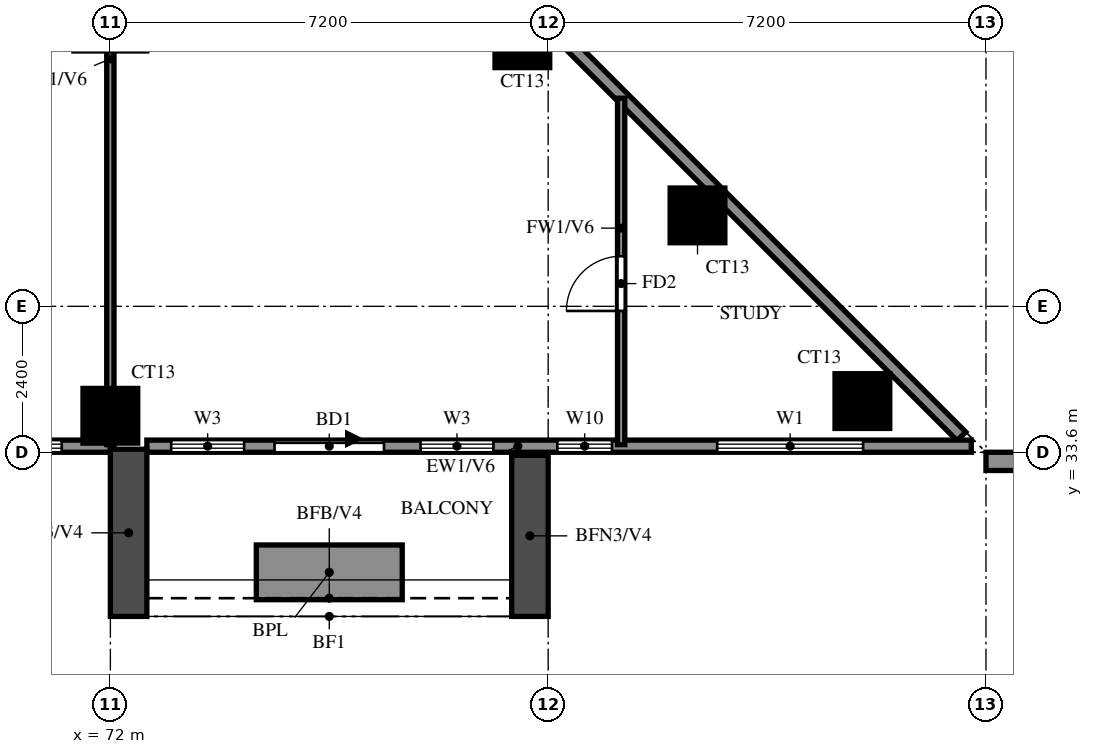
"""IFC4 building model, lengths in metres.
Left out: names, types, materials, properties, quantities, classifications, styles, units other than length and angle.
Written with IfcOpenShell. Run it as: python <this file> out.ifc"""

import sys

from ifc_helpers import new_model, si_unit, direction, frame, frame_2d, origin, origin_2d, place, context, subcontext, project, spatial, rectangle, extrude, source, transform, mapped, element, fill, save


model = new_model("IFC4")
c1 = context("Model", 3, precision=1e-05, world=origin(), true_north=direction((0.0, 1.0)))
c2 = subcontext(c1, "Body", "Model", "MODEL_VIEW")
j1 = project(units=[si_unit("LENGTHUNIT", "METRE"), si_unit("PLANEANGLEUNIT", "RADIAN")], contexts=[c1])
p1 = place(None, origin())
s1 = spatial("IfcSite", under=j1, at=p1, CompositionType="ELEMENT")
p2 = place(p1, origin())
s2 = spatial("IfcBuilding", under=s1, at=p2, CompositionType="ELEMENT")
p3 = place(p2, frame((0.0, 0.0, 104.0)))
s3 = spatial("IfcBuildingStorey", under=s2, at=p3, CompositionType="ELEMENT", Elevation=104.0)
m1 = source(origin(), c2, "Body", "SweptSolid", [
    extrude(rectangle(XDim=0.9, YDim=0.9, at=origin_2d()), origin(), (0.0, 0.0, 1.0), 3.1),
])
for number, where, z_axis, x_axis in (
    (1, (72.0, 34.2, 0.0), (0.0, 0.0, 1.0), (1.0, 0.0, 0.0)),
    (2, (84.367, 34.442, 0.0), (0.0, 0.0, 1.0), (1.0, 0.0, 0.0)),
    (3, (81.656, 37.496, 0.0), (0.0, 0.0, 1.0), (1.0, 0.0, 0.0)),
    (4, (78.776, 40.376, 0.0), (0.0, 0.0, 1.0), (1.0, 0.0, 0.0)),
):
    element("IfcColumn", number, at=place(p3, frame(where, z_axis=z_axis, x_axis=x_axis)), inside=s3, PredefinedType="COLUMN", context=c2, shape_type="MappedRepresentation", body=[
        mapped(m1, transform((0.0, 0.0, 0.0))),
    ])
p4 = place(p3, frame((85.996, 33.863, 0.0), z_axis=(0.0, 0.0, 1.0), x_axis=(-0.707100718496, 0.707112843825, 0.0)))
e5 = element("IfcWall", 5, at=p4, inside=s3, PredefinedType="SOLIDWALL", context=c2, shape_type="SweptSolid", body=[
    extrude(rectangle(XDim=20.135, YDim=0.2, at=frame_2d((10.067, 0.0))), origin(), (0.0, 0.0, 1.0), 3.1),
])
p5 = place(p3, frame((58.8, 33.7, 0.0), z_axis=(0.0, 0.0, 1.0), x_axis=(1.0, 0.0, 0.0)))
e6 = element("IfcWall", 6, at=p5, inside=s3, PredefinedType="SOLIDWALL", context=c2, shape_type="SweptSolid", body=[
    extrude(rectangle(XDim=13.2, YDim=0.2, at=frame_2d((6.6, 0.0))), origin(), (0.0, 0.0, 1.0), 3.1),
])
p6 = place(p5, frame((10.0, 0.0, 0.6)))
e7 = element("IfcOpeningElement", 7, at=p6, cuts=e6, PredefinedType="OPENING", context=c2, shape_type="SweptSolid", body=[
    extrude(rectangle(XDim=2.4, YDim=2.4, at=frame_2d((1.2, 1.2))), frame((0.0, 0.11, 0.0), z_axis=(0.0, -1.0, 0.0), x_axis=(1.0, 0.0, 0.0)), (0.0, 0.0, 1.0), 0.22),
])
p7 = place(p5, frame((7.55, 0.0, 1.5)))
e8 = element("IfcOpeningElement", 8, at=p7, cuts=e6, PredefinedType="OPENING", context=c2, shape_type="SweptSolid", body=[
    extrude(rectangle(XDim=0.9, YDim=0.9, at=frame_2d((0.45, 0.45))), frame((0.0, 0.11, 0.0), z_axis=(0.0, -1.0, 0.0), x_axis=(1.0, 0.0, 0.0)), (0.0, 0.0, 1.0), 0.22),
])
p8 = place(p5, frame((2.2, 0.0, 0.6)))
e9 = element("IfcOpeningElement", 9, at=p8, cuts=e6, PredefinedType="OPENING", context=c2, shape_type="SweptSolid", body=[
    extrude(rectangle(XDim=2.4, YDim=2.4, at=frame_2d((1.2, 1.2))), frame((0.0, 0.11, 0.0), z_axis=(0.0, -1.0, 0.0), x_axis=(1.0, 0.0, 0.0)), (0.0, 0.0, 1.0), 0.22),
])
p9 = place(p3, frame((72.6, 33.7, 0.0), z_axis=(0.0, 0.0, 1.0), x_axis=(1.0, 0.0, 0.0)))
e10 = element("IfcWall", 10, at=p9, inside=s3, PredefinedType="SOLIDWALL", context=c2, shape_type="SweptSolid", body=[
    extrude(rectangle(XDim=13.559, YDim=0.2, at=frame_2d((6.779, 0.0))), origin(), (0.0, 0.0, 1.0), 3.1),
])
p10 = place(p9, frame((2.1, 0.0, 0.0)))
e11 = element("IfcOpeningElement", 11, at=p10, cuts=e10, PredefinedType="OPENING", context=c2, shape_type="SweptSolid", body=[
    extrude(rectangle(XDim=1.8, YDim=2.4, at=frame_2d((0.9, 1.2))), frame((0.0, 0.11, 0.0), z_axis=(0.0, -1.0, 0.0), x_axis=(1.0, 0.0, 0.0)), (0.0, 0.0, 1.0), 0.22),
])
p11 = place(p9, frame((0.4, 0.0, 0.6)))
e12 = element("IfcOpeningElement", 12, at=p11, cuts=e10, PredefinedType="OPENING", context=c2, shape_type="SweptSolid", body=[
    extrude(rectangle(XDim=1.2, YDim=2.4, at=frame_2d((0.6, 1.2))), frame((0.0, 0.11, 0.0), z_axis=(0.0, -1.0, 0.0), x_axis=(1.0, 0.0, 0.0)), (0.0, 0.0, 1.0), 0.22),
])
p12 = place(p9, frame((4.5, 0.0, 0.6)))
e13 = element("IfcOpeningElement", 13, at=p12, cuts=e10, PredefinedType="OPENING", context=c2, shape_type="SweptSolid", body=[
    extrude(rectangle(XDim=1.2, YDim=2.4, at=frame_2d((0.6, 1.2))), frame((0.0, 0.11, 0.0), z_axis=(0.0, -1.0, 0.0), x_axis=(1.0, 0.0, 0.0)), (0.0, 0.0, 1.0), 0.22),
])
p13 = place(p9, frame((6.75, 0.0, 0.6)))
e14 = element("IfcOpeningElement", 14, at=p13, cuts=e10, PredefinedType="OPENING", context=c2, shape_type="SweptSolid", body=[
    extrude(rectangle(XDim=0.9, YDim=2.4, at=frame_2d((0.45, 1.2))), frame((0.0, 0.11, 0.0), z_axis=(0.0, -1.0, 0.0), x_axis=(1.0, 0.0, 0.0)), (0.0, 0.0, 1.0), 0.22),
])
p14 = place(p9, frame((9.379, 0.0, 0.6)))
e15 = element("IfcOpeningElement", 15, at=p14, cuts=e10, PredefinedType="OPENING", context=c2, shape_type="SweptSolid", body=[
    extrude(rectangle(XDim=2.4, YDim=2.4, at=frame_2d((1.2, 1.2))), frame((0.0, 0.11, 0.0), z_axis=(0.0, -1.0, 0.0), x_axis=(1.0, 0.0, 0.0)), (0.0, 0.0, 1.0), 0.22),
])
p15 = place(p3, frame((86.4, 33.45, -0.32), z_axis=(0.0, 0.0, 1.0), x_axis=(1.0, 0.0, 0.0)))
e16 = element("IfcWall", 16, at=p15, inside=s3, PredefinedType="SOLIDWALL", context=c2, shape_type="SweptSolid", body=[
    extrude(rectangle(XDim=2.4, YDim=0.3, at=frame_2d((1.2, 0.0))), origin(), (0.0, 0.0, 1.0), 3.42),
])
p16 = place(p3, frame((72.3, 33.65, 0.0), z_axis=(0.0, 0.0, 1.0), x_axis=(0.0, -1.0, 0.0)))
e17 = element("IfcWall", 17, at=p16, inside=s3, PredefinedType="SOLIDWALL", context=c2, shape_type="SweptSolid", body=[
    extrude(rectangle(XDim=2.75, YDim=0.6, at=frame_2d((1.375, 0.0))), origin(), (0.0, 0.0, 1.0), 2.77),
])
p17 = place(p3, frame((78.9, 33.55, 0.0), z_axis=(0.0, 0.0, 1.0), x_axis=(0.0, -1.0, 0.0)))
e18 = element("IfcWall", 18, at=p17, inside=s3, PredefinedType="SOLIDWALL", context=c2, shape_type="SweptSolid", body=[
    extrude(rectangle(XDim=2.65, YDim=0.6, at=frame_2d((1.325, 0.0))), origin(), (0.0, 0.0, 1.0), 2.77),
])
p18 = place(p3, frame((74.4, 31.625, 0.0), z_axis=(0.0, 0.0, 1.0), x_axis=(1.0, 0.0, 0.0)))
e19 = element("IfcWall", 19, at=p18, inside=s3, PredefinedType="SOLIDWALL", context=c2, shape_type="SweptSolid", body=[
    extrude(rectangle(XDim=2.4, YDim=0.9, at=frame_2d((1.2, 0.0))), origin(), (0.0, 0.0, 1.0), 0.9),
])
p19 = place(p3, frame((72.0, 33.725, 0.0), z_axis=(0.0, 0.0, 1.0), x_axis=(0.0, 1.0, 0.0)))
e20 = element("IfcWall", 20, at=p19, inside=s3, PredefinedType="PARTITIONING", context=c2, shape_type="SweptSolid", body=[
    extrude(rectangle(XDim=14.098, YDim=0.12, at=frame_2d((7.049, 0.0))), origin(), (0.0, 0.0, 1.0), 3.1),
])
p20 = place(p19, frame((10.075, 0.0, 0.0)))
e21 = element("IfcOpeningElement", 21, at=p20, cuts=e20, PredefinedType="OPENING", context=c2, shape_type="SweptSolid", body=[
    extrude(rectangle(XDim=0.9, YDim=2.1, at=frame_2d((0.45, 1.05))), frame((0.0, 0.07, 0.0), z_axis=(0.0, -1.0, 0.0), x_axis=(1.0, 0.0, 0.0)), (0.0, 0.0, 1.0), 0.14),
])
p21 = place(p3, frame((80.4, 33.725, 0.0), z_axis=(0.0, 0.0, 1.0), x_axis=(0.0, 1.0, 0.0)))
e22 = element("IfcWall", 22, at=p21, inside=s3, PredefinedType="PARTITIONING", context=c2, shape_type="SweptSolid", body=[
    extrude(rectangle(XDim=5.698, YDim=0.12, at=frame_2d((2.849, 0.0))), origin(), (0.0, 0.0, 1.0), 3.1),
])
p22 = place(p21, frame((2.199, 0.0, 0.0)))
e23 = element("IfcOpeningElement", 23, at=p22, cuts=e22, PredefinedType="OPENING", context=c2, shape_type="SweptSolid", body=[
    extrude(rectangle(XDim=0.9, YDim=2.1, at=frame_2d((0.45, 1.05))), frame((0.0, 0.07, 0.0), z_axis=(0.0, -1.0, 0.0), x_axis=(1.0, 0.0, 0.0)), (0.0, 0.0, 1.0), 0.14),
])
p23 = place(p6, origin())
e24 = element("IfcWindow", 24, at=p23, inside=s3, PartitioningType="DOUBLE_PANEL_VERTICAL", PredefinedType="WINDOW", context=c2, shape_type="SweptSolid", body=[
    extrude(rectangle(XDim=2.4, YDim=2.4, at=frame_2d((1.2, 1.2))), frame((0.0, 0.03, 0.0), z_axis=(0.0, -1.0, 0.0), x_axis=(1.0, 0.0, 0.0)), (0.0, 0.0, 1.0), 0.06),
])
fill(e7, e24)
p24 = place(p10, origin())
e25 = element("IfcDoor", 25, at=p24, inside=s3, OperationType="DOUBLE_DOOR_SLIDING", PredefinedType="DOOR", context=c2, shape_type="SweptSolid", body=[
    extrude(rectangle(XDim=1.8, YDim=2.4, at=frame_2d((0.9, 1.2))), frame((0.0, 0.025, 0.0), z_axis=(0.0, -1.0, 0.0), x_axis=(1.0, 0.0, 0.0)), (0.0, 0.0, 1.0), 0.05),
])
fill(e11, e25)
p25 = place(p11, origin())
e26 = element("IfcWindow", 26, at=p25, inside=s3, PartitioningType="SINGLE_PANEL", PredefinedType="WINDOW", context=c2, shape_type="SweptSolid", body=[
    extrude(rectangle(XDim=1.2, YDim=2.4, at=frame_2d((0.6, 1.2))), frame((0.0, 0.03, 0.0), z_axis=(0.0, -1.0, 0.0), x_axis=(1.0, 0.0, 0.0)), (0.0, 0.0, 1.0), 0.06),
])
fill(e12, e26)
p26 = place(p12, origin())
e27 = element("IfcWindow", 27, at=p26, inside=s3, PartitioningType="SINGLE_PANEL", PredefinedType="WINDOW", context=c2, shape_type="SweptSolid", body=[
    extrude(rectangle(XDim=1.2, YDim=2.4, at=frame_2d((0.6, 1.2))), frame((0.0, 0.03, 0.0), z_axis=(0.0, -1.0, 0.0), x_axis=(1.0, 0.0, 0.0)), (0.0, 0.0, 1.0), 0.06),
])
fill(e13, e27)
p27 = place(p13, origin())
e28 = element("IfcWindow", 28, at=p27, inside=s3, PartitioningType="SINGLE_PANEL", PredefinedType="WINDOW", context=c2, shape_type="SweptSolid", body=[
    extrude(rectangle(XDim=0.9, YDim=2.4, at=frame_2d((0.45, 1.2))), frame((0.0, 0.03, 0.0), z_axis=(0.0, -1.0, 0.0), x_axis=(1.0, 0.0, 0.0)), (0.0, 0.0, 1.0), 0.06),
])
fill(e14, e28)
p28 = place(p14, origin())
e29 = element("IfcWindow", 29, at=p28, inside=s3, PartitioningType="DOUBLE_PANEL_VERTICAL", PredefinedType="WINDOW", context=c2, shape_type="SweptSolid", body=[
    extrude(rectangle(XDim=2.4, YDim=2.4, at=frame_2d((1.2, 1.2))), frame((0.0, 0.03, 0.0), z_axis=(0.0, -1.0, 0.0), x_axis=(1.0, 0.0, 0.0)), (0.0, 0.0, 1.0), 0.06),
])
fill(e15, e29)
p29 = place(p22, origin())
e30 = element("IfcDoor", 30, at=p29, inside=s3, OperationType="SINGLE_SWING_RIGHT", PredefinedType="DOOR", context=c2, shape_type="SweptSolid", body=[
    extrude(rectangle(XDim=0.9, YDim=2.1, at=frame_2d((0.45, 1.05))), frame((0.0, 0.025, 0.0), z_axis=(0.0, -1.0, 0.0), x_axis=(1.0, 0.0, 0.0)), (0.0, 0.0, 1.0), 0.05),
])
fill(e23, e30)
save(model, sys.argv[1])
